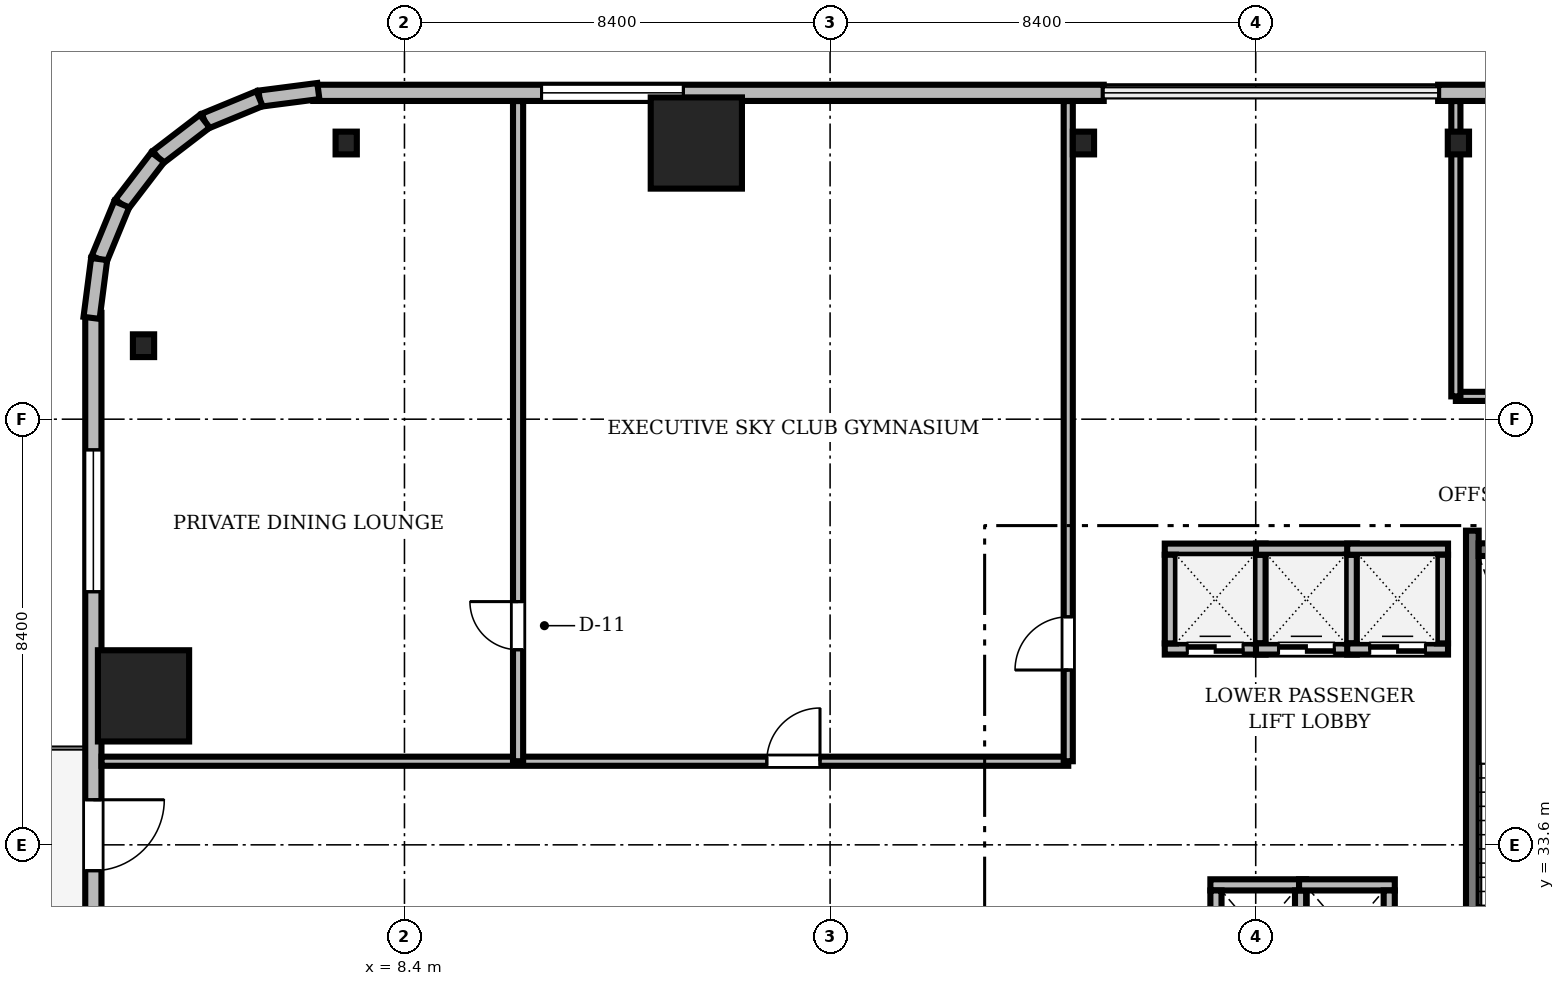
"""IFC4 building model, lengths in metres.
Left out: names, types, materials, properties, quantities, classifications, styles, units other than length and angle.
Written with IfcOpenShell. Run it as: python <this file> out.ifc"""

import sys

from ifc_helpers import new_model, si_unit, direction, frame, frame_2d, origin, origin_2d, place, context, subcontext, project, spatial, rectangle, i_section, extrude, source, transform, mapped, element, fill, save


model = new_model("IFC4")
c1 = context("Model", 3, precision=1e-05, world=origin(), true_north=direction((0.0, 1.0)))
c2 = subcontext(c1, "Body", "Model", "MODEL_VIEW")
j1 = project(units=[si_unit("LENGTHUNIT", "METRE"), si_unit("PLANEANGLEUNIT", "RADIAN")], contexts=[c1])
p1 = place(None, origin())
s1 = spatial("IfcSite", under=j1, at=p1, CompositionType="ELEMENT")
p2 = place(p1, origin())
s2 = spatial("IfcBuilding", under=s1, at=p2, CompositionType="ELEMENT")
p3 = place(p2, frame((0.0, 0.0, 42.2)))
s3 = spatial("IfcBuildingStorey", under=s2, at=p3, CompositionType="ELEMENT", Elevation=42.2)
m1 = source(origin(), c2, "Body", "SweptSolid", [
    extrude(rectangle(XDim=1.8, YDim=1.8, at=origin_2d()), origin(), (0.0, 0.0, 1.0), 3.41),
])
for number, where, z_axis, x_axis in (
    (1, (14.16, 47.45, 0.0), (0.0, 0.0, 1.0), (1.0, 0.0, 0.0)),
    (2, (3.25, 36.54, 0.0), (0.0, 0.0, 1.0), (1.0, 0.0, 0.0)),
):
    element("IfcColumn", number, at=place(p3, frame(where, z_axis=z_axis, x_axis=x_axis)), inside=s3, PredefinedType="COLUMN", context=c2, shape_type="MappedRepresentation", body=[
        mapped(m1, transform((0.0, 0.0, 0.0), scale=1.0)),
    ])
m2 = source(origin(), c2, "Body", "SweptSolid", [
    extrude(i_section(OverallWidth=0.419, OverallDepth=0.449, WebThickness=0.031, FlangeThickness=0.048, FilletRadius=0.015, at=origin_2d()), origin(), (0.0, 0.0, 1.0), 3.41),
])
for number, where, z_axis, x_axis in (
    (3, (29.2, 47.45, 0.0), (0.0, 0.0, 1.0), (1.0, 0.0, 0.0)),
    (4, (21.8, 47.45, 0.0), (0.0, 0.0, 1.0), (1.0, 0.0, 0.0)),
    (5, (7.25, 47.45, 0.0), (0.0, 0.0, 1.0), (1.0, 0.0, 0.0)),
    (6, (3.25, 43.45, 0.0), (0.0, 0.0, 1.0), (1.0, 0.0, 0.0)),
):
    element("IfcColumn", number, at=place(p3, frame(where, z_axis=z_axis, x_axis=x_axis)), inside=s3, PredefinedType="COLUMN", context=c2, shape_type="MappedRepresentation", body=[
        mapped(m2, transform((0.0, 0.0, 0.0), scale=1.0)),
    ])
m3 = source(origin(), c2, "Body", "SweptSolid", [
    extrude(rectangle(XDim=15.6, YDim=0.32, at=frame_2d((7.8, 0.0))), origin(), (0.0, 0.0, 1.0), 3.41),
])
p4 = place(p3, frame((44.4, 48.44, 0.0), z_axis=(0.0, 0.0, 1.0), x_axis=(-1.0, 0.0, 0.0)))
e7 = element("IfcWall", 7, at=p4, inside=s3, PredefinedType="SOLIDWALL", context=c2, shape_type="MappedRepresentation", body=[
    mapped(m3, transform((0.0, 0.0, 0.0), scale=1.0)),
])
m4 = source(origin(), c2, "Body", "SweptSolid", [
    extrude(rectangle(XDim=1.4, YDim=2.3, at=frame_2d((0.7, 1.15))), frame((0.0, 0.17, 0.0), z_axis=(0.0, -1.0, 0.0), x_axis=(1.0, 0.0, 0.0)), (0.0, 0.0, 1.0), 0.34),
])
p5 = place(p4, frame((9.61, 0.0, 0.0)))
e8 = element("IfcOpeningElement", 8, at=p5, cuts=e7, PredefinedType="OPENING", context=c2, shape_type="MappedRepresentation", body=[
    mapped(m4, transform((0.0, 0.0, 0.0), scale=1.0)),
])
m5 = source(origin(), c2, "Body", "SweptSolid", [
    extrude(rectangle(XDim=2.8, YDim=2.4, at=frame_2d((1.4, 1.2))), frame((0.0, 0.17, 0.0), z_axis=(0.0, -1.0, 0.0), x_axis=(1.0, 0.0, 0.0)), (0.0, 0.0, 1.0), 0.34),
])
p6 = place(p4, frame((2.705, 0.0, 0.72)))
e9 = element("IfcOpeningElement", 9, at=p6, cuts=e7, PredefinedType="OPENING", context=c2, shape_type="MappedRepresentation", body=[
    mapped(m5, transform((0.0, 0.0, 0.0), scale=1.0)),
])
p7 = place(p3, frame((22.2, 48.44, 0.0), z_axis=(0.0, 0.0, 1.0), x_axis=(-1.0, 0.0, 0.0)))
e10 = element("IfcWall", 10, at=p7, inside=s3, PredefinedType="SOLIDWALL", context=c2, shape_type="MappedRepresentation", body=[
    mapped(m3, transform((0.0, 0.0, 0.0), scale=1.0)),
])
p8 = place(p7, frame((8.295, 0.0, 0.72)))
e11 = element("IfcOpeningElement", 11, at=p8, cuts=e10, PredefinedType="OPENING", context=c2, shape_type="MappedRepresentation", body=[
    mapped(m5, transform((0.0, 0.0, 0.0), scale=1.0)),
])
m6 = source(origin(), c2, "Body", "SweptSolid", [
    extrude(rectangle(XDim=15.6, YDim=0.32, at=frame_2d((7.8, 0.0))), origin(), (0.0, 0.0, 1.0), 3.41),
])
p9 = place(p3, frame((2.26, 44.1, 0.0), z_axis=(0.0, 0.0, 1.0), x_axis=(0.0, -1.0, 0.0)))
e12 = element("IfcWall", 12, at=p9, inside=s3, PredefinedType="SOLIDWALL", context=c2, shape_type="MappedRepresentation", body=[
    mapped(m6, transform((0.0, 0.0, 0.0), scale=1.0)),
])
p10 = place(p9, frame((9.61, 0.0, 0.0)))
e13 = element("IfcOpeningElement", 13, at=p10, cuts=e12, PredefinedType="OPENING", context=c2, shape_type="MappedRepresentation", body=[
    mapped(m4, transform((0.0, 0.0, 0.0), scale=1.0)),
])
p11 = place(p9, frame((2.705, 0.0, 0.72)))
e14 = element("IfcOpeningElement", 14, at=p11, cuts=e12, PredefinedType="OPENING", context=c2, shape_type="MappedRepresentation", body=[
    mapped(m5, transform((0.0, 0.0, 0.0), scale=1.0)),
])
m7 = source(origin(), c2, "Body", "SweptSolid", [
    extrude(rectangle(XDim=1.17, YDim=0.32, at=frame_2d((0.585, 0.0))), origin(), (0.0, 0.0, 1.0), 3.41),
])
p12 = place(p3, frame((6.7, 48.476, 0.0), z_axis=(0.0, 0.0, 1.0), x_axis=(-0.991735963317, -0.128295670475, 0.0)))
e15 = element("IfcWall", 15, at=p12, inside=s3, PredefinedType="SOLIDWALL", context=c2, shape_type="MappedRepresentation", body=[
    mapped(m7, transform((0.0, 0.0, 0.0), scale=1.0)),
])
m8 = source(origin(), c2, "Body", "SweptSolid", [
    extrude(rectangle(XDim=1.169, YDim=0.32, at=frame_2d((0.584, 0.0))), origin(), (0.0, 0.0, 1.0), 3.41),
])
p13 = place(p3, frame((5.54, 48.325, 0.0), z_axis=(0.0, 0.0, 1.0), x_axis=(-0.924552646638, -0.381054331552, 0.0)))
e16 = element("IfcWall", 16, at=p13, inside=s3, PredefinedType="SOLIDWALL", context=c2, shape_type="MappedRepresentation", body=[
    mapped(m8, transform((0.0, 0.0, 0.0), scale=1.0)),
])
m9 = source(origin(), c2, "Body", "SweptSolid", [
    extrude(rectangle(XDim=1.169, YDim=0.32, at=frame_2d((0.584, 0.0))), origin(), (0.0, 0.0, 1.0), 3.41),
])
p14 = place(p3, frame((4.459, 47.88, 0.0), z_axis=(0.0, 0.0, 1.0), x_axis=(-0.793663520347, -0.608356981114, 0.0)))
e17 = element("IfcWall", 17, at=p14, inside=s3, PredefinedType="SOLIDWALL", context=c2, shape_type="MappedRepresentation", body=[
    mapped(m9, transform((0.0, 0.0, 0.0), scale=1.0)),
])
m10 = source(origin(), c2, "Body", "SweptSolid", [
    extrude(rectangle(XDim=1.169, YDim=0.32, at=frame_2d((0.584, 0.0))), origin(), (0.0, 0.0, 1.0), 3.41),
])
p15 = place(p3, frame((3.531, 47.169, 0.0), z_axis=(0.0, 0.0, 1.0), x_axis=(-0.608387696831, -0.793639975269, 0.0)))
e18 = element("IfcWall", 18, at=p15, inside=s3, PredefinedType="SOLIDWALL", context=c2, shape_type="MappedRepresentation", body=[
    mapped(m10, transform((0.0, 0.0, 0.0), scale=1.0)),
])
p16 = place(p3, frame((2.82, 46.241, 0.0), z_axis=(0.0, 0.0, 1.0), x_axis=(-0.381054331552, -0.924552646638, 0.0)))
e19 = element("IfcWall", 19, at=p16, inside=s3, PredefinedType="SOLIDWALL", context=c2, shape_type="MappedRepresentation", body=[
    mapped(m8, transform((0.0, 0.0, 0.0), scale=1.0)),
])
p17 = place(p3, frame((2.375, 45.16, 0.0), z_axis=(0.0, 0.0, 1.0), x_axis=(-0.128295670475, -0.991735963317, 0.0)))
e20 = element("IfcWall", 20, at=p17, inside=s3, PredefinedType="SOLIDWALL", context=c2, shape_type="MappedRepresentation", body=[
    mapped(m7, transform((0.0, 0.0, 0.0), scale=1.0)),
])
m11 = source(origin(), c2, "Body", "SweptSolid", [
    extrude(rectangle(XDim=9.15, YDim=0.25, at=frame_2d((4.575, 0.0))), origin(), (0.0, 0.0, 1.0), 3.45),
])
p18 = place(p3, frame((29.475, 30.65, 0.0), z_axis=(0.0, 0.0, 1.0), x_axis=(0.0, 1.0, 0.0)))
e21 = element("IfcWall", 21, at=p18, inside=s3, PredefinedType="SOLIDWALL", context=c2, shape_type="MappedRepresentation", body=[
    mapped(m11, transform((0.0, 0.0, 0.0), scale=1.0)),
])
m12 = source(origin(), c2, "Body", "SweptSolid", [
    extrude(rectangle(XDim=3.15, YDim=0.25, at=frame_2d((1.575, 0.0))), origin(), (0.0, 0.0, 1.0), 3.45),
])
p19 = place(p3, frame((29.6, 39.425, 0.0), z_axis=(0.0, 0.0, 1.0), x_axis=(1.0, 0.0, 0.0)))
e22 = element("IfcWall", 22, at=p19, inside=s3, PredefinedType="SOLIDWALL", context=c2, shape_type="MappedRepresentation", body=[
    mapped(m12, transform((0.0, 0.0, 0.0), scale=1.0)),
])
m13 = source(origin(), c2, "Body", "SweptSolid", [
    extrude(rectangle(XDim=1.99, YDim=0.22, at=frame_2d((0.995, 0.0))), origin(), (0.0, 0.0, 1.0), 3.41),
])
p20 = place(p3, frame((23.405, 37.465, 0.0), z_axis=(0.0, 0.0, 1.0), x_axis=(1.0, 0.0, 0.0)))
e23 = element("IfcWall", 23, at=p20, inside=s3, PredefinedType="SOLIDWALL", context=c2, shape_type="MappedRepresentation", body=[
    mapped(m13, transform((0.0, 0.0, 0.0), scale=1.0)),
])
m14 = source(origin(), c2, "Body", "SweptSolid", [
    extrude(rectangle(XDim=1.1, YDim=2.2, at=frame_2d((0.55, 1.1))), frame((0.0, 0.12, 0.0), z_axis=(0.0, -1.0, 0.0), x_axis=(1.0, 0.0, 0.0)), (0.0, 0.0, 1.0), 0.24),
])
p21 = place(p20, frame((0.445, 0.0, 0.0)))
e24 = element("IfcOpeningElement", 24, at=p21, cuts=e23, PredefinedType="OPENING", context=c2, shape_type="MappedRepresentation", body=[
    mapped(m14, transform((0.0, 0.0, 0.0), scale=1.0)),
])
p22 = place(p3, frame((23.405, 39.435, 0.0), z_axis=(0.0, 0.0, 1.0), x_axis=(1.0, 0.0, 0.0)))
e25 = element("IfcWall", 25, at=p22, inside=s3, PredefinedType="SOLIDWALL", context=c2, shape_type="MappedRepresentation", body=[
    mapped(m13, transform((0.0, 0.0, 0.0), scale=1.0)),
])
m15 = source(origin(), c2, "Body", "SweptSolid", [
    extrude(rectangle(XDim=1.75, YDim=0.22, at=frame_2d((0.875, 0.0))), origin(), (0.0, 0.0, 1.0), 3.41),
])
for number, where, z_axis, x_axis in (
    (26, (23.515, 37.575, 0.0), (0.0, 0.0, 1.0), (0.0, 1.0, 0.0)),
    (27, (25.285, 37.575, 0.0), (0.0, 0.0, 1.0), (0.0, 1.0, 0.0)),
):
    element("IfcWall", number, at=place(p3, frame(where, z_axis=z_axis, x_axis=x_axis)), inside=s3, PredefinedType="SOLIDWALL", context=c2, shape_type="MappedRepresentation", body=[
        mapped(m15, transform((0.0, 0.0, 0.0), scale=1.0)),
    ])
p23 = place(p3, frame((25.205, 37.465, 0.0), z_axis=(0.0, 0.0, 1.0), x_axis=(1.0, 0.0, 0.0)))
e28 = element("IfcWall", 28, at=p23, inside=s3, PredefinedType="SOLIDWALL", context=c2, shape_type="MappedRepresentation", body=[
    mapped(m13, transform((0.0, 0.0, 0.0), scale=1.0)),
])
p24 = place(p23, frame((0.445, 0.0, 0.0)))
e29 = element("IfcOpeningElement", 29, at=p24, cuts=e28, PredefinedType="OPENING", context=c2, shape_type="MappedRepresentation", body=[
    mapped(m14, transform((0.0, 0.0, 0.0), scale=1.0)),
])
p25 = place(p3, frame((25.205, 39.435, 0.0), z_axis=(0.0, 0.0, 1.0), x_axis=(1.0, 0.0, 0.0)))
e30 = element("IfcWall", 30, at=p25, inside=s3, PredefinedType="SOLIDWALL", context=c2, shape_type="MappedRepresentation", body=[
    mapped(m13, transform((0.0, 0.0, 0.0), scale=1.0)),
])
p26 = place(p3, frame((27.085, 37.575, 0.0), z_axis=(0.0, 0.0, 1.0), x_axis=(0.0, 1.0, 0.0)))
e31 = element("IfcWall", 31, at=p26, inside=s3, PredefinedType="SOLIDWALL", context=c2, shape_type="MappedRepresentation", body=[
    mapped(m15, transform((0.0, 0.0, 0.0), scale=1.0)),
])
m16 = source(origin(), c2, "Body", "SweptSolid", [
    extrude(rectangle(XDim=1.99, YDim=0.22, at=frame_2d((0.995, 0.0))), origin(), (0.0, 0.0, 1.0), 3.41),
])
p27 = place(p3, frame((27.005, 37.465, 0.0), z_axis=(0.0, 0.0, 1.0), x_axis=(1.0, 0.0, 0.0)))
e32 = element("IfcWall", 32, at=p27, inside=s3, PredefinedType="SOLIDWALL", context=c2, shape_type="MappedRepresentation", body=[
    mapped(m16, transform((0.0, 0.0, 0.0), scale=1.0)),
])
p28 = place(p27, frame((0.445, 0.0, 0.0)))
e33 = element("IfcOpeningElement", 33, at=p28, cuts=e32, PredefinedType="OPENING", context=c2, shape_type="MappedRepresentation", body=[
    mapped(m14, transform((0.0, 0.0, 0.0), scale=1.0)),
])
p29 = place(p3, frame((27.005, 39.435, 0.0), z_axis=(0.0, 0.0, 1.0), x_axis=(1.0, 0.0, 0.0)))
e34 = element("IfcWall", 34, at=p29, inside=s3, PredefinedType="SOLIDWALL", context=c2, shape_type="MappedRepresentation", body=[
    mapped(m16, transform((0.0, 0.0, 0.0), scale=1.0)),
])
p30 = place(p3, frame((28.885, 37.575, 0.0), z_axis=(0.0, 0.0, 1.0), x_axis=(0.0, 1.0, 0.0)))
e35 = element("IfcWall", 35, at=p30, inside=s3, PredefinedType="SOLIDWALL", context=c2, shape_type="MappedRepresentation", body=[
    mapped(m15, transform((0.0, 0.0, 0.0), scale=1.0)),
])
m17 = source(origin(), c2, "Body", "SweptSolid", [
    extrude(rectangle(XDim=1.89, YDim=0.22, at=frame_2d((0.945, 0.0))), origin(), (0.0, 0.0, 1.0), 3.41),
])
p31 = place(p3, frame((24.305, 32.81, 0.0), z_axis=(0.0, 0.0, 1.0), x_axis=(1.0, 0.0, 0.0)))
e36 = element("IfcWall", 36, at=p31, inside=s3, PredefinedType="SOLIDWALL", context=c2, shape_type="MappedRepresentation", body=[
    mapped(m17, transform((0.0, 0.0, 0.0), scale=1.0)),
])
m18 = source(origin(), c2, "Body", "SweptSolid", [
    extrude(rectangle(XDim=1.7, YDim=0.22, at=frame_2d((0.85, 0.0))), origin(), (0.0, 0.0, 1.0), 3.41),
])
for number, where, z_axis, x_axis in (
    (37, (24.415, 31.0, 0.0), (0.0, 0.0, 1.0), (0.0, 1.0, 0.0)),
    (38, (26.085, 31.0, 0.0), (0.0, 0.0, 1.0), (0.0, 1.0, 0.0)),
):
    element("IfcWall", number, at=place(p3, frame(where, z_axis=z_axis, x_axis=x_axis)), inside=s3, PredefinedType="SOLIDWALL", context=c2, shape_type="MappedRepresentation", body=[
        mapped(m18, transform((0.0, 0.0, 0.0), scale=1.0)),
    ])
p32 = place(p3, frame((26.055, 32.81, 0.0), z_axis=(0.0, 0.0, 1.0), x_axis=(1.0, 0.0, 0.0)))
e39 = element("IfcWall", 39, at=p32, inside=s3, PredefinedType="SOLIDWALL", context=c2, shape_type="MappedRepresentation", body=[
    mapped(m17, transform((0.0, 0.0, 0.0), scale=1.0)),
])
p33 = place(p3, frame((27.835, 31.0, 0.0), z_axis=(0.0, 0.0, 1.0), x_axis=(0.0, 1.0, 0.0)))
e40 = element("IfcWall", 40, at=p33, inside=s3, PredefinedType="SOLIDWALL", context=c2, shape_type="MappedRepresentation", body=[
    mapped(m18, transform((0.0, 0.0, 0.0), scale=1.0)),
])
m19 = source(origin(), c2, "Body", "SweptSolid", [
    extrude(rectangle(XDim=19.428, YDim=0.18, at=frame_2d((9.714, 0.0))), origin(), (0.0, 0.0, 1.0), 2.652),
])
p34 = place(p3, frame((29.15, 42.45, 0.0), z_axis=(0.0, 0.0, 1.0), x_axis=(1.0, 0.0, 0.0)))
e41 = element("IfcWall", 41, at=p34, inside=s3, PredefinedType="PARTITIONING", context=c2, shape_type="MappedRepresentation", body=[
    mapped(m19, transform((0.0, 0.0, 0.0), scale=1.0)),
])
m20 = source(origin(), c2, "Body", "SweptSolid", [
    extrude(rectangle(XDim=1.05, YDim=2.2, at=frame_2d((0.525, 1.1))), frame((0.0, 0.1, 0.0), z_axis=(0.0, -1.0, 0.0), x_axis=(1.0, 0.0, 0.0)), (0.0, 0.0, 1.0), 0.2),
])
p35 = place(p34, frame((4.5, 0.0, 0.0)))
e42 = element("IfcOpeningElement", 42, at=p35, cuts=e41, PredefinedType="OPENING", context=c2, shape_type="MappedRepresentation", body=[
    mapped(m20, transform((0.0, 0.0, 0.0), scale=1.0)),
])
m21 = source(origin(), c2, "Body", "SweptSolid", [
    extrude(rectangle(XDim=19.078, YDim=0.18, at=frame_2d((9.539, 0.0))), origin(), (0.0, 0.0, 1.0), 2.652),
])
p36 = place(p3, frame((2.422, 35.25, 0.0), z_axis=(0.0, 0.0, 1.0), x_axis=(1.0, 0.0, 0.0)))
e43 = element("IfcWall", 43, at=p36, inside=s3, PredefinedType="PARTITIONING", context=c2, shape_type="MappedRepresentation", body=[
    mapped(m21, transform((0.0, 0.0, 0.0), scale=1.0)),
])
p37 = place(p36, frame((13.129, 0.0, 0.0)))
e44 = element("IfcOpeningElement", 44, at=p37, cuts=e43, PredefinedType="OPENING", context=c2, shape_type="MappedRepresentation", body=[
    mapped(m20, transform((0.0, 0.0, 0.0), scale=1.0)),
])
m22 = source(origin(), c2, "Body", "SweptSolid", [
    extrude(rectangle(XDim=13.028, YDim=0.2, at=frame_2d((6.514, 0.0))), origin(), (0.0, 0.0, 1.0), 2.652),
])
p38 = place(p3, frame((10.642, 35.25, 0.0), z_axis=(0.0, 0.0, 1.0), x_axis=(0.0, 1.0, 0.0)))
e45 = element("IfcWall", 45, at=p38, inside=s3, PredefinedType="PARTITIONING", context=c2, shape_type="MappedRepresentation", body=[
    mapped(m22, transform((0.0, 0.0, 0.0), scale=1.0)),
])
m23 = source(origin(), c2, "Body", "SweptSolid", [
    extrude(rectangle(XDim=0.95, YDim=2.15, at=frame_2d((0.475, 1.075))), frame((0.0, 0.11, 0.0), z_axis=(0.0, -1.0, 0.0), x_axis=(1.0, 0.0, 0.0)), (0.0, 0.0, 1.0), 0.22),
])
p39 = place(p38, frame((2.2, 0.0, 0.0)))
e46 = element("IfcOpeningElement", 46, at=p39, cuts=e45, PredefinedType="OPENING", context=c2, shape_type="MappedRepresentation", body=[
    mapped(m23, transform((0.0, 0.0, 0.0), scale=1.0)),
])
m24 = source(origin(), c2, "Body", "SweptSolid", [
    extrude(rectangle(XDim=13.028, YDim=0.18, at=frame_2d((6.514, 0.0))), origin(), (0.0, 0.0, 1.0), 2.652),
])
p40 = place(p3, frame((21.5, 35.25, 0.0), z_axis=(0.0, 0.0, 1.0), x_axis=(0.0, 1.0, 0.0)))
e47 = element("IfcWall", 47, at=p40, inside=s3, PredefinedType="PARTITIONING", context=c2, shape_type="MappedRepresentation", body=[
    mapped(m24, transform((0.0, 0.0, 0.0), scale=1.0)),
])
p41 = place(p40, frame((1.8, 0.0, 0.0)))
e48 = element("IfcOpeningElement", 48, at=p41, cuts=e47, PredefinedType="OPENING", context=c2, shape_type="MappedRepresentation", body=[
    mapped(m20, transform((0.0, 0.0, 0.0), scale=1.0)),
])
m25 = source(origin(), c2, "Body", "SweptSolid", [
    extrude(rectangle(XDim=5.828, YDim=0.18, at=frame_2d((2.914, 0.0))), origin(), (0.0, 0.0, 1.0), 2.652),
])
p42 = place(p3, frame((29.15, 42.45, 0.0), z_axis=(0.0, 0.0, 1.0), x_axis=(0.0, 1.0, 0.0)))
e49 = element("IfcWall", 49, at=p42, inside=s3, PredefinedType="PARTITIONING", context=c2, shape_type="MappedRepresentation", body=[
    mapped(m25, transform((0.0, 0.0, 0.0), scale=1.0)),
])
m26 = source(origin(), c2, "Body", "SweptSolid", [
    extrude(rectangle(XDim=2.8, YDim=2.4, at=frame_2d((1.4, 1.2))), frame((0.0, 0.03, 0.0), z_axis=(0.0, -1.0, 0.0), x_axis=(1.0, 0.0, 0.0)), (0.0, 0.0, 1.0), 0.06),
])
p43 = place(p8, origin())
e50 = element("IfcWindow", 50, at=p43, inside=s3, PartitioningType="SINGLE_PANEL", PredefinedType="WINDOW", context=c2, shape_type="MappedRepresentation", body=[
    mapped(m26, transform((0.0, 0.0, 0.0), scale=1.0)),
])
fill(e11, e50)
m27 = source(origin(), c2, "Body", "SweptSolid", [
    extrude(rectangle(XDim=1.4, YDim=2.3, at=frame_2d((0.7, 1.15))), frame((0.0, 0.025, 0.0), z_axis=(0.0, -1.0, 0.0), x_axis=(1.0, 0.0, 0.0)), (0.0, 0.0, 1.0), 0.05),
])
p44 = place(p10, frame((1.4, 0.0, 0.0), z_axis=(0.0, 0.0, 1.0), x_axis=(-1.0, 0.0, 0.0)))
e51 = element("IfcDoor", 51, at=p44, inside=s3, OperationType="DOUBLE_DOOR_SLIDING", PredefinedType="DOOR", context=c2, shape_type="MappedRepresentation", body=[
    mapped(m27, transform((0.0, 0.0, 0.0), scale=1.0)),
])
fill(e13, e51)
p45 = place(p11, origin())
e52 = element("IfcWindow", 52, at=p45, inside=s3, PartitioningType="SINGLE_PANEL", PredefinedType="WINDOW", context=c2, shape_type="MappedRepresentation", body=[
    mapped(m26, transform((0.0, 0.0, 0.0), scale=1.0)),
])
fill(e14, e52)
m28 = source(origin(), c2, "Body", "SweptSolid", [
    extrude(rectangle(XDim=1.1, YDim=2.2, at=frame_2d((0.55, 1.1))), frame((0.0, 0.025, 0.0), z_axis=(0.0, -1.0, 0.0), x_axis=(1.0, 0.0, 0.0)), (0.0, 0.0, 1.0), 0.05),
])
p46 = place(p21, origin())
e53 = element("IfcDoor", 53, at=p46, inside=s3, OperationType="DOUBLE_DOOR_SLIDING", PredefinedType="DOOR", context=c2, shape_type="MappedRepresentation", body=[
    mapped(m28, transform((0.0, 0.0, 0.0), scale=1.0)),
])
fill(e24, e53)
p47 = place(p24, origin())
e54 = element("IfcDoor", 54, at=p47, inside=s3, OperationType="DOUBLE_DOOR_SLIDING", PredefinedType="DOOR", context=c2, shape_type="MappedRepresentation", body=[
    mapped(m28, transform((0.0, 0.0, 0.0), scale=1.0)),
])
fill(e29, e54)
p48 = place(p28, origin())
e55 = element("IfcDoor", 55, at=p48, inside=s3, OperationType="DOUBLE_DOOR_SLIDING", PredefinedType="DOOR", context=c2, shape_type="MappedRepresentation", body=[
    mapped(m28, transform((0.0, 0.0, 0.0), scale=1.0)),
])
fill(e33, e55)
m29 = source(origin(), c2, "Body", "SweptSolid", [
    extrude(rectangle(XDim=1.05, YDim=2.2, at=frame_2d((0.525, 1.1))), frame((0.0, 0.025, 0.0), z_axis=(0.0, -1.0, 0.0), x_axis=(1.0, 0.0, 0.0)), (0.0, 0.0, 1.0), 0.05),
])
p49 = place(p37, origin())
e56 = element("IfcDoor", 56, at=p49, inside=s3, OperationType="SINGLE_SWING_RIGHT", PredefinedType="DOOR", context=c2, shape_type="MappedRepresentation", body=[
    mapped(m29, transform((0.0, 0.0, 0.0), scale=1.0)),
])
fill(e44, e56)
m30 = source(origin(), c2, "Body", "SweptSolid", [
    extrude(rectangle(XDim=0.95, YDim=2.15, at=frame_2d((0.475, 1.075))), frame((0.0, 0.025, 0.0), z_axis=(0.0, -1.0, 0.0), x_axis=(1.0, 0.0, 0.0)), (0.0, 0.0, 1.0), 0.05),
])
p50 = place(p39, origin())
e57 = element("IfcDoor", 57, at=p50, inside=s3, OperationType="SINGLE_SWING_RIGHT", PredefinedType="DOOR", context=c2, shape_type="MappedRepresentation", body=[
    mapped(m30, transform((0.0, 0.0, 0.0), scale=1.0)),
])
fill(e46, e57)
p51 = place(p41, origin())
e58 = element("IfcDoor", 58, at=p51, inside=s3, OperationType="SINGLE_SWING_LEFT", PredefinedType="DOOR", context=c2, shape_type="MappedRepresentation", body=[
    mapped(m29, transform((0.0, 0.0, 0.0), scale=1.0)),
])
fill(e48, e58)
save(model, sys.argv[1])
